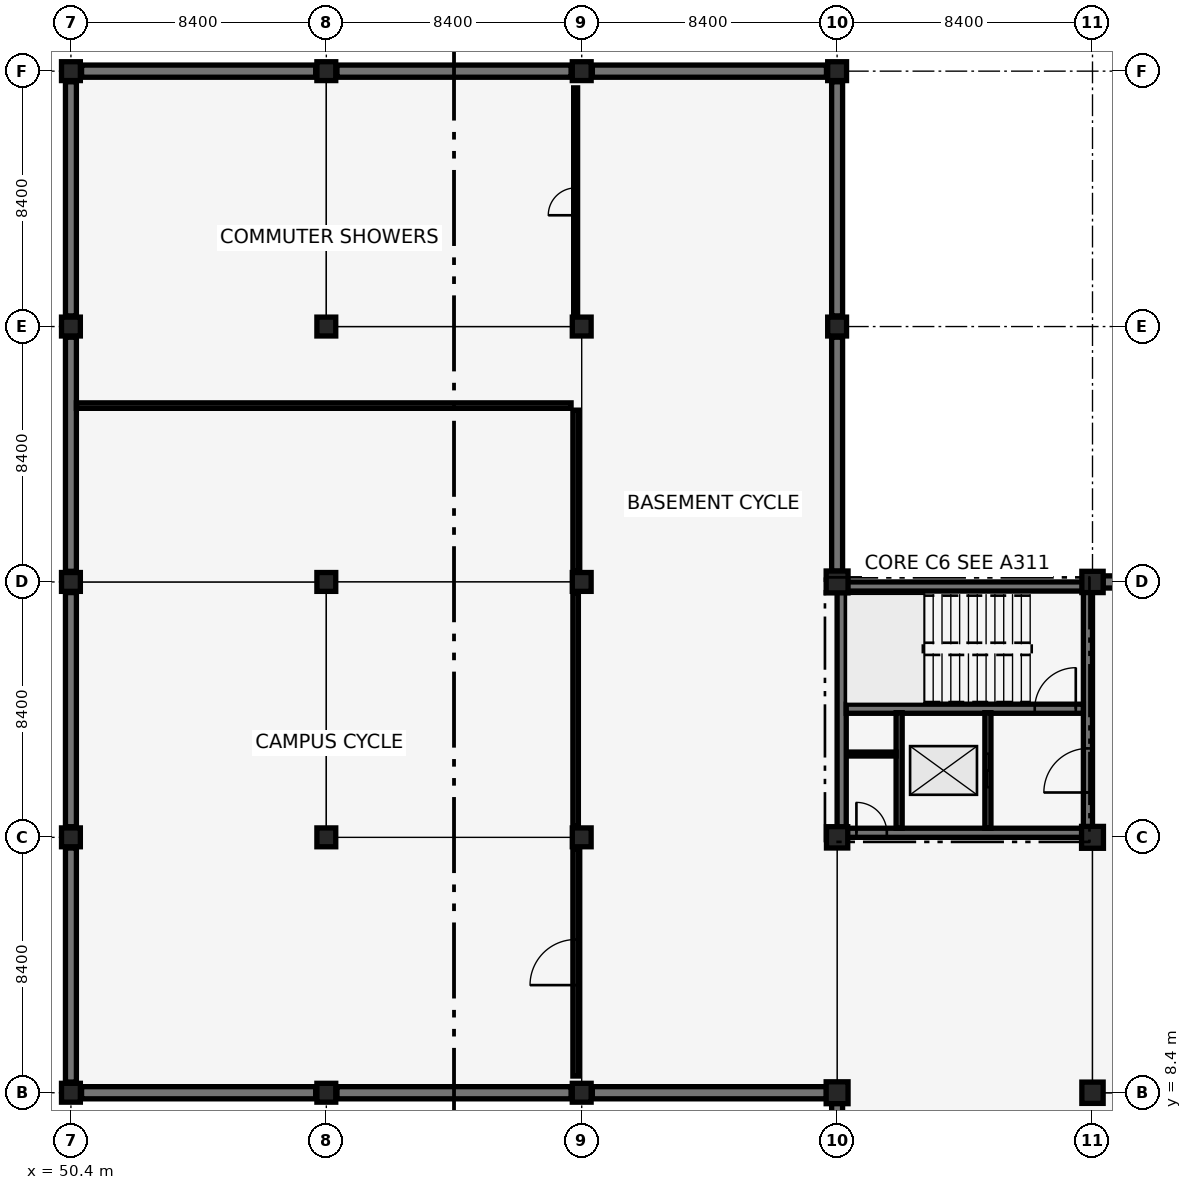
"""IFC4 building model, lengths in metres.
Left out: names, types, materials, properties, quantities, classifications, styles, units other than length and angle.
Written with IfcOpenShell. Run it as: python <this file> out.ifc"""

import sys

from ifc_helpers import new_model, si_unit, direction, frame, frame_2d, origin, origin_2d, place, context, subcontext, project, spatial, rectangle, extrude, element, fill, save


model = new_model("IFC4")
c1 = context("Model", 3, precision=1e-05, world=origin(), true_north=direction((0.0, 1.0)))
c2 = subcontext(c1, "Body", "Model", "MODEL_VIEW")
j1 = project(units=[si_unit("LENGTHUNIT", "METRE"), si_unit("PLANEANGLEUNIT", "RADIAN")], contexts=[c1])
p1 = place(None, origin())
s1 = spatial("IfcSite", under=j1, at=p1, CompositionType="ELEMENT")
p2 = place(p1, origin())
s2 = spatial("IfcBuilding", under=s1, at=p2, CompositionType="ELEMENT")
p3 = place(p2, frame((0.0, 0.0, -4.42)))
s3 = spatial("IfcBuildingStorey", under=s2, at=p3, CompositionType="ELEMENT", Elevation=-4.42)
p4 = place(p3, frame((50.75, 8.4, 0.0), z_axis=(0.0, 0.0, 1.0), x_axis=(1.0, 0.0, 0.0)))
e1 = element("IfcWall", 1, at=p4, inside=s3, PredefinedType="USERDEFINED", context=c2, shape_type="SweptSolid", body=[
    extrude(rectangle(XDim=7.7, YDim=0.4, at=frame_2d((3.85, 0.0))), origin(), (0.0, 0.0, 1.0), 4.12),
])
p5 = place(p3, frame((50.4, 8.75, 0.0), z_axis=(0.0, 0.0, 1.0), x_axis=(0.0, 1.0, 0.0)))
e2 = element("IfcWall", 2, at=p5, inside=s3, PredefinedType="USERDEFINED", context=c2, shape_type="SweptSolid", body=[
    extrude(rectangle(XDim=7.7, YDim=0.36, at=frame_2d((3.85, 0.0))), origin(), (0.0, 0.0, 1.0), 4.12),
])
p6 = place(p3, frame((50.4, 17.15, 0.0), z_axis=(0.0, 0.0, 1.0), x_axis=(0.0, 1.0, 0.0)))
e3 = element("IfcWall", 3, at=p6, inside=s3, PredefinedType="USERDEFINED", context=c2, shape_type="SweptSolid", body=[
    extrude(rectangle(XDim=7.7, YDim=0.36, at=frame_2d((3.85, 0.0))), origin(), (0.0, 0.0, 1.0), 4.12),
])
p7 = place(p3, frame((50.4, 25.55, 0.0), z_axis=(0.0, 0.0, 1.0), x_axis=(0.0, 1.0, 0.0)))
e4 = element("IfcWall", 4, at=p7, inside=s3, PredefinedType="USERDEFINED", context=c2, shape_type="SweptSolid", body=[
    extrude(rectangle(XDim=7.7, YDim=0.36, at=frame_2d((3.85, 0.0))), origin(), (0.0, 0.0, 1.0), 4.12),
])
p8 = place(p3, frame((50.75, 42.0, 0.0), z_axis=(0.0, 0.0, 1.0), x_axis=(1.0, 0.0, 0.0)))
e5 = element("IfcWall", 5, at=p8, inside=s3, PredefinedType="USERDEFINED", context=c2, shape_type="SweptSolid", body=[
    extrude(rectangle(XDim=7.7, YDim=0.4, at=frame_2d((3.85, 0.0))), origin(), (0.0, 0.0, 1.0), 4.12),
])
p9 = place(p3, frame((50.4, 33.95, 0.0), z_axis=(0.0, 0.0, 1.0), x_axis=(0.0, 1.0, 0.0)))
e6 = element("IfcWall", 6, at=p9, inside=s3, PredefinedType="USERDEFINED", context=c2, shape_type="SweptSolid", body=[
    extrude(rectangle(XDim=7.7, YDim=0.36, at=frame_2d((3.85, 0.0))), origin(), (0.0, 0.0, 1.0), 4.12),
])
for number, where, z_axis, x_axis in (
    (7, (59.15, 8.4, 0.0), (0.0, 0.0, 1.0), (1.0, 0.0, 0.0)),
    (8, (59.15, 42.0, 0.0), (0.0, 0.0, 1.0), (1.0, 0.0, 0.0)),
):
    element("IfcWall", number, at=place(p3, frame(where, z_axis=z_axis, x_axis=x_axis)), inside=s3, PredefinedType="USERDEFINED", context=c2, shape_type="SweptSolid", body=[
        extrude(rectangle(XDim=7.7, YDim=0.4, at=frame_2d((3.85, 0.0))), origin(), (0.0, 0.0, 1.0), 4.12),
    ])
p10 = place(p3, frame((67.55, 8.4, 0.0), z_axis=(0.0, 0.0, 1.0), x_axis=(1.0, 0.0, 0.0)))
e9 = element("IfcWall", 9, at=p10, inside=s3, PredefinedType="USERDEFINED", context=c2, shape_type="SweptSolid", body=[
    extrude(rectangle(XDim=7.7, YDim=0.4, at=frame_2d((3.85, 0.0))), origin(), (0.0, 0.0, 1.0), 4.12),
])
p11 = place(p3, frame((75.6, 25.55, 0.0), z_axis=(0.0, 0.0, 1.0), x_axis=(0.0, 1.0, 0.0)))
e10 = element("IfcWall", 10, at=p11, inside=s3, PredefinedType="USERDEFINED", context=c2, shape_type="SweptSolid", body=[
    extrude(rectangle(XDim=7.7, YDim=0.36, at=frame_2d((3.85, 0.0))), origin(), (0.0, 0.0, 1.0), 4.12),
])
p12 = place(p3, frame((67.55, 42.0, 0.0), z_axis=(0.0, 0.0, 1.0), x_axis=(1.0, 0.0, 0.0)))
e11 = element("IfcWall", 11, at=p12, inside=s3, PredefinedType="USERDEFINED", context=c2, shape_type="SweptSolid", body=[
    extrude(rectangle(XDim=7.7, YDim=0.4, at=frame_2d((3.85, 0.0))), origin(), (0.0, 0.0, 1.0), 4.12),
])
for number, where, z_axis, x_axis in (
    (12, (75.6, 33.95, 0.0), (0.0, 0.0, 1.0), (0.0, 1.0, 0.0)),
    (13, (75.6, 0.35, 0.0), (0.0, 0.0, 1.0), (0.0, 1.0, 0.0)),
):
    element("IfcWall", number, at=place(p3, frame(where, z_axis=z_axis, x_axis=x_axis)), inside=s3, PredefinedType="USERDEFINED", context=c2, shape_type="SweptSolid", body=[
        extrude(rectangle(XDim=7.7, YDim=0.36, at=frame_2d((3.85, 0.0))), origin(), (0.0, 0.0, 1.0), 4.12),
    ])
p13 = place(p3, frame((84.35, 25.2, 0.0), z_axis=(0.0, 0.0, 1.0), x_axis=(1.0, 0.0, 0.0)))
e14 = element("IfcWall", 14, at=p13, inside=s3, PredefinedType="USERDEFINED", context=c2, shape_type="SweptSolid", body=[
    extrude(rectangle(XDim=7.7, YDim=0.4, at=frame_2d((3.85, 0.0))), origin(), (0.0, 0.0, 1.0), 4.12),
])
p14 = place(p3, frame((75.75, 16.95, 0.0), z_axis=(0.0, 0.0, 1.0), x_axis=(1.0, 0.0, 0.0)))
e15 = element("IfcWall", 15, at=p14, inside=s3, PredefinedType="SHEAR", context=c2, shape_type="SweptSolid", body=[
    extrude(rectangle(XDim=8.1, YDim=0.3, at=frame_2d((4.05, 0.0))), origin(), (0.0, 0.0, 1.0), 4.12),
])
p15 = place(p14, frame((0.485, 0.0, 0.0)))
e16 = element("IfcOpeningElement", 16, at=p15, cuts=e15, PredefinedType="OPENING", context=c2, shape_type="SweptSolid", body=[
    extrude(rectangle(XDim=1.0, YDim=2.15, at=frame_2d((0.5, 1.075))), frame((0.0, 0.16, 0.0), z_axis=(0.0, -1.0, 0.0), x_axis=(1.0, 0.0, 0.0)), (0.0, 0.0, 1.0), 0.32),
])
for number, where, z_axis, x_axis in (
    (17, (75.75, 25.05, 0.0), (0.0, 0.0, 1.0), (1.0, 0.0, 0.0)),
    (18, (75.75, 16.95, 0.0), (0.0, 0.0, 1.0), (0.0, 1.0, 0.0)),
):
    element("IfcWall", number, at=place(p3, frame(where, z_axis=z_axis, x_axis=x_axis)), inside=s3, PredefinedType="SHEAR", context=c2, shape_type="SweptSolid", body=[
        extrude(rectangle(XDim=8.1, YDim=0.3, at=frame_2d((4.05, 0.0))), origin(), (0.0, 0.0, 1.0), 4.12),
    ])
p16 = place(p3, frame((83.85, 16.95, 0.0), z_axis=(0.0, 0.0, 1.0), x_axis=(0.0, 1.0, 0.0)))
e19 = element("IfcWall", 19, at=p16, inside=s3, PredefinedType="SHEAR", context=c2, shape_type="SweptSolid", body=[
    extrude(rectangle(XDim=8.1, YDim=0.3, at=frame_2d((4.05, 0.0))), origin(), (0.0, 0.0, 1.0), 4.12),
])
p17 = place(p16, frame((1.325, 0.0, 0.0)))
e20 = element("IfcOpeningElement", 20, at=p17, cuts=e19, PredefinedType="OPENING", context=c2, shape_type="SweptSolid", body=[
    extrude(rectangle(XDim=1.45, YDim=2.15, at=frame_2d((0.725, 1.075))), frame((0.0, 0.16, 0.0), z_axis=(0.0, -1.0, 0.0), x_axis=(1.0, 0.0, 0.0)), (0.0, 0.0, 1.0), 0.32),
])
p18 = place(p3, frame((75.9, 21.03, 0.0), z_axis=(0.0, 0.0, 1.0), x_axis=(1.0, 0.0, 0.0)))
e21 = element("IfcWall", 21, at=p18, inside=s3, PredefinedType="SHEAR", context=c2, shape_type="SweptSolid", body=[
    extrude(rectangle(XDim=7.8, YDim=0.3, at=frame_2d((3.9, 0.0))), origin(), (0.0, 0.0, 1.0), 4.12),
])
p19 = place(p18, frame((6.2, 0.0, 0.0)))
e22 = element("IfcOpeningElement", 22, at=p19, cuts=e21, PredefinedType="OPENING", context=c2, shape_type="SweptSolid", body=[
    extrude(rectangle(XDim=1.35, YDim=2.15, at=frame_2d((0.675, 1.075))), frame((0.0, 0.16, 0.0), z_axis=(0.0, -1.0, 0.0), x_axis=(1.0, 0.0, 0.0)), (0.0, 0.0, 1.0), 0.32),
])
for number, where, z_axis, x_axis in (
    (23, (50.4, 8.4, -0.4), (0.0, 0.0, 1.0), (1.0, 0.0, 0.0)),
    (24, (50.4, 16.8, -0.4), (0.0, 0.0, 1.0), (1.0, 0.0, 0.0)),
    (25, (50.4, 25.2, -0.4), (0.0, 0.0, 1.0), (1.0, 0.0, 0.0)),
    (26, (50.4, 33.6, -0.4), (0.0, 0.0, 1.0), (1.0, 0.0, 0.0)),
    (27, (50.4, 42.0, -0.4), (0.0, 0.0, 1.0), (1.0, 0.0, 0.0)),
    (28, (58.8, 8.4, -0.4), (0.0, 0.0, 1.0), (1.0, 0.0, 0.0)),
    (29, (58.8, 16.8, -0.4), (0.0, 0.0, 1.0), (1.0, 0.0, 0.0)),
    (30, (58.8, 25.2, -0.4), (0.0, 0.0, 1.0), (1.0, 0.0, 0.0)),
    (31, (58.8, 33.6, -0.4), (0.0, 0.0, 1.0), (1.0, 0.0, 0.0)),
    (32, (58.8, 42.0, -0.4), (0.0, 0.0, 1.0), (1.0, 0.0, 0.0)),
    (33, (67.2, 8.4, -0.4), (0.0, 0.0, 1.0), (1.0, 0.0, 0.0)),
    (34, (67.2, 16.8, -0.4), (0.0, 0.0, 1.0), (1.0, 0.0, 0.0)),
    (35, (67.2, 25.2, -0.4), (0.0, 0.0, 1.0), (1.0, 0.0, 0.0)),
    (36, (67.2, 33.6, -0.4), (0.0, 0.0, 1.0), (1.0, 0.0, 0.0)),
    (37, (67.2, 42.0, -0.4), (0.0, 0.0, 1.0), (1.0, 0.0, 0.0)),
):
    element("IfcColumn", number, at=place(p3, frame(where, z_axis=z_axis, x_axis=x_axis)), inside=s3, PredefinedType="COLUMN", context=c2, shape_type="SweptSolid", body=[
        extrude(rectangle(XDim=0.62, YDim=0.62, at=origin_2d()), origin(), (0.0, 0.0, 1.0), 4.52),
    ])
p20 = place(p3, frame((75.6, 8.4, -0.4), z_axis=(0.0, 0.0, 1.0), x_axis=(1.0, 0.0, 0.0)))
e38 = element("IfcColumn", 38, at=p20, inside=s3, PredefinedType="COLUMN", context=c2, shape_type="SweptSolid", body=[
    extrude(rectangle(XDim=0.72, YDim=0.72, at=origin_2d()), origin(), (0.0, 0.0, 1.0), 4.52),
])
p21 = place(p3, frame((75.6, 16.8, -0.4), z_axis=(0.0, 0.0, 1.0), x_axis=(1.0, 0.0, 0.0)))
e39 = element("IfcColumn", 39, at=p21, inside=s3, PredefinedType="COLUMN", context=c2, shape_type="SweptSolid", body=[
    extrude(rectangle(XDim=0.7, YDim=0.7, at=origin_2d()), origin(), (0.0, 0.0, 1.0), 4.52),
])
p22 = place(p3, frame((75.6, 25.2, -0.4), z_axis=(0.0, 0.0, 1.0), x_axis=(1.0, 0.0, 0.0)))
e40 = element("IfcColumn", 40, at=p22, inside=s3, PredefinedType="COLUMN", context=c2, shape_type="SweptSolid", body=[
    extrude(rectangle(XDim=0.72, YDim=0.72, at=origin_2d()), origin(), (0.0, 0.0, 1.0), 4.52),
])
for number, where, z_axis, x_axis in (
    (41, (75.6, 33.6, -0.4), (0.0, 0.0, 1.0), (1.0, 0.0, 0.0)),
    (42, (75.6, 42.0, -0.4), (0.0, 0.0, 1.0), (1.0, 0.0, 0.0)),
):
    element("IfcColumn", number, at=place(p3, frame(where, z_axis=z_axis, x_axis=x_axis)), inside=s3, PredefinedType="COLUMN", context=c2, shape_type="SweptSolid", body=[
        extrude(rectangle(XDim=0.62, YDim=0.62, at=origin_2d()), origin(), (0.0, 0.0, 1.0), 4.52),
    ])
p23 = place(p3, frame((84.0, 8.4, -0.4), z_axis=(0.0, 0.0, 1.0), x_axis=(1.0, 0.0, 0.0)))
e43 = element("IfcColumn", 43, at=p23, inside=s3, PredefinedType="COLUMN", context=c2, shape_type="SweptSolid", body=[
    extrude(rectangle(XDim=0.7, YDim=0.7, at=origin_2d()), origin(), (0.0, 0.0, 1.0), 4.52),
])
p24 = place(p3, frame((84.0, 16.8, -0.4), z_axis=(0.0, 0.0, 1.0), x_axis=(1.0, 0.0, 0.0)))
e44 = element("IfcColumn", 44, at=p24, inside=s3, PredefinedType="COLUMN", context=c2, shape_type="SweptSolid", body=[
    extrude(rectangle(XDim=0.72, YDim=0.72, at=origin_2d()), origin(), (0.0, 0.0, 1.0), 4.52),
])
p25 = place(p3, frame((84.0, 25.2, -0.4), z_axis=(0.0, 0.0, 1.0), x_axis=(1.0, 0.0, 0.0)))
e45 = element("IfcColumn", 45, at=p25, inside=s3, PredefinedType="COLUMN", context=c2, shape_type="SweptSolid", body=[
    extrude(rectangle(XDim=0.7, YDim=0.7, at=origin_2d()), origin(), (0.0, 0.0, 1.0), 4.52),
])
p26 = place(p3, frame((80.56, 17.1, 0.0), z_axis=(0.0, 0.0, 1.0), x_axis=(0.0, 1.0, 0.0)))
e46 = element("IfcWall", 46, at=p26, inside=s3, PredefinedType="SHEAR", context=c2, shape_type="SweptSolid", body=[
    extrude(rectangle(XDim=3.8, YDim=0.2, at=frame_2d((1.9, 0.0))), origin(), (0.0, 0.0, 1.0), 3.24),
])
p27 = place(p26, frame((1.35, 0.0, 0.0)))
e47 = element("IfcOpeningElement", 47, at=p27, cuts=e46, PredefinedType="OPENING", context=c2, shape_type="SweptSolid", body=[
    extrude(rectangle(XDim=1.1, YDim=2.15, at=frame_2d((0.55, 1.075))), frame((0.0, 0.11, 0.0), z_axis=(0.0, -1.0, 0.0), x_axis=(1.0, 0.0, 0.0)), (0.0, 0.0, 1.0), 0.22),
])
p28 = place(p3, frame((77.64, 17.1, 0.0), z_axis=(0.0, 0.0, 1.0), x_axis=(0.0, 1.0, 0.0)))
e48 = element("IfcWall", 48, at=p28, inside=s3, PredefinedType="SHEAR", context=c2, shape_type="SweptSolid", body=[
    extrude(rectangle(XDim=3.8, YDim=0.2, at=frame_2d((1.9, 0.0))), origin(), (0.0, 0.0, 1.0), 3.24),
])
p29 = place(p3, frame((75.92, 19.54, 0.0), z_axis=(0.0, 0.0, 1.0), x_axis=(1.0, 0.0, 0.0)))
e49 = element("IfcWall", 49, at=p29, inside=s3, PredefinedType="PARTITIONING", context=c2, shape_type="SweptSolid", body=[
    extrude(rectangle(XDim=1.62, YDim=0.13, at=frame_2d((0.81, 0.0))), origin(), (0.0, 0.0, 1.0), 4.12),
])
p30 = place(p3, frame((67.0, 8.95, 0.0), z_axis=(0.0, 0.0, 1.0), x_axis=(0.0, 1.0, 0.0)))
e50 = element("IfcWall", 50, at=p30, inside=s3, PredefinedType="PARTITIONING", context=c2, shape_type="SweptSolid", body=[
    extrude(rectangle(XDim=7.48, YDim=0.18, at=frame_2d((3.74, 0.0))), origin(), (0.0, 0.0, 1.0), 3.22),
])
p31 = place(p30, frame((2.99, 0.0, 0.0)))
e51 = element("IfcOpeningElement", 51, at=p31, cuts=e50, PredefinedType="OPENING", context=c2, shape_type="SweptSolid", body=[
    extrude(rectangle(XDim=1.5, YDim=2.2, at=frame_2d((0.75, 1.1))), frame((0.0, 0.1, 0.0), z_axis=(0.0, -1.0, 0.0), x_axis=(1.0, 0.0, 0.0)), (0.0, 0.0, 1.0), 0.2),
])
p32 = place(p3, frame((67.0, 17.17, 0.0), z_axis=(0.0, 0.0, 1.0), x_axis=(0.0, 1.0, 0.0)))
e52 = element("IfcWall", 52, at=p32, inside=s3, PredefinedType="PARTITIONING", context=c2, shape_type="SweptSolid", body=[
    extrude(rectangle(XDim=7.66, YDim=0.18, at=frame_2d((3.83, 0.0))), origin(), (0.0, 0.0, 1.0), 3.22),
])
p33 = place(p3, frame((67.0, 25.57, 0.0), z_axis=(0.0, 0.0, 1.0), x_axis=(0.0, 1.0, 0.0)))
e53 = element("IfcWall", 53, at=p33, inside=s3, PredefinedType="PARTITIONING", context=c2, shape_type="SweptSolid", body=[
    extrude(rectangle(XDim=5.28, YDim=0.18, at=frame_2d((2.64, 0.0))), origin(), (0.0, 0.0, 1.0), 3.22),
])
p34 = place(p3, frame((50.58, 31.0, 0.0), z_axis=(0.0, 0.0, 1.0), x_axis=(1.0, 0.0, 0.0)))
e54 = element("IfcWall", 54, at=p34, inside=s3, PredefinedType="PARTITIONING", context=c2, shape_type="SweptSolid", body=[
    extrude(rectangle(XDim=16.27, YDim=0.18, at=frame_2d((8.135, 0.0))), origin(), (0.0, 0.0, 1.0), 3.3),
])
p35 = place(p3, frame((67.0, 33.97, 0.0), z_axis=(0.0, 0.0, 1.0), x_axis=(0.0, 1.0, 0.0)))
e55 = element("IfcWall", 55, at=p35, inside=s3, PredefinedType="PARTITIONING", context=c2, shape_type="SweptSolid", body=[
    extrude(rectangle(XDim=7.48, YDim=0.13, at=frame_2d((3.74, 0.0))), origin(), (0.0, 0.0, 1.0), 3.22),
])
p36 = place(p35, frame((3.29, 0.0, 0.0)))
e56 = element("IfcOpeningElement", 56, at=p36, cuts=e55, PredefinedType="OPENING", context=c2, shape_type="SweptSolid", body=[
    extrude(rectangle(XDim=0.9, YDim=2.1, at=frame_2d((0.45, 1.05))), frame((0.0, 0.075, 0.0), z_axis=(0.0, -1.0, 0.0), x_axis=(1.0, 0.0, 0.0)), (0.0, 0.0, 1.0), 0.15),
])
p37 = place(p19, origin())
e57 = element("IfcDoor", 57, at=p37, inside=s3, OperationType="SINGLE_SWING_RIGHT", PredefinedType="DOOR", context=c2, shape_type="SweptSolid", body=[
    extrude(rectangle(XDim=1.35, YDim=2.15, at=frame_2d((0.675, 1.075))), frame((0.0, 0.025, 0.0), z_axis=(0.0, -1.0, 0.0), x_axis=(1.0, 0.0, 0.0)), (0.0, 0.0, 1.0), 0.05),
])
fill(e22, e57)
p38 = place(p27, origin())
e58 = element("IfcDoor", 58, at=p38, inside=s3, OperationType="SLIDING_TO_LEFT", PredefinedType="DOOR", context=c2, shape_type="SweptSolid", body=[
    extrude(rectangle(XDim=1.1, YDim=2.15, at=frame_2d((0.55, 1.075))), frame((0.0, 0.025, 0.0), z_axis=(0.0, -1.0, 0.0), x_axis=(1.0, 0.0, 0.0)), (0.0, 0.0, 1.0), 0.05),
])
fill(e47, e58)
p39 = place(p17, origin())
e59 = element("IfcDoor", 59, at=p39, inside=s3, OperationType="DOUBLE_DOOR_SINGLE_SWING", PredefinedType="DOOR", context=c2, shape_type="SweptSolid", body=[
    extrude(rectangle(XDim=1.45, YDim=2.15, at=frame_2d((0.725, 1.075))), frame((0.0, 0.025, 0.0), z_axis=(0.0, -1.0, 0.0), x_axis=(1.0, 0.0, 0.0)), (0.0, 0.0, 1.0), 0.05),
])
fill(e20, e59)
p40 = place(p15, origin())
e60 = element("IfcDoor", 60, at=p40, inside=s3, OperationType="SINGLE_SWING_LEFT", PredefinedType="DOOR", context=c2, shape_type="SweptSolid", body=[
    extrude(rectangle(XDim=1.0, YDim=2.15, at=frame_2d((0.5, 1.075))), frame((0.0, 0.025, 0.0), z_axis=(0.0, -1.0, 0.0), x_axis=(1.0, 0.0, 0.0)), (0.0, 0.0, 1.0), 0.05),
])
fill(e16, e60)
p41 = place(p31, origin())
e61 = element("IfcDoor", 61, at=p41, inside=s3, OperationType="DOUBLE_DOOR_SINGLE_SWING", PredefinedType="DOOR", context=c2, shape_type="SweptSolid", body=[
    extrude(rectangle(XDim=1.5, YDim=2.2, at=frame_2d((0.75, 1.1))), frame((0.0, 0.025, 0.0), z_axis=(0.0, -1.0, 0.0), x_axis=(1.0, 0.0, 0.0)), (0.0, 0.0, 1.0), 0.05),
])
fill(e51, e61)
p42 = place(p36, origin())
e62 = element("IfcDoor", 62, at=p42, inside=s3, OperationType="SINGLE_SWING_LEFT", PredefinedType="DOOR", context=c2, shape_type="SweptSolid", body=[
    extrude(rectangle(XDim=0.9, YDim=2.1, at=frame_2d((0.45, 1.05))), frame((0.0, 0.025, 0.0), z_axis=(0.0, -1.0, 0.0), x_axis=(1.0, 0.0, 0.0)), (0.0, 0.0, 1.0), 0.05),
])
fill(e56, e62)
save(model, sys.argv[1])
